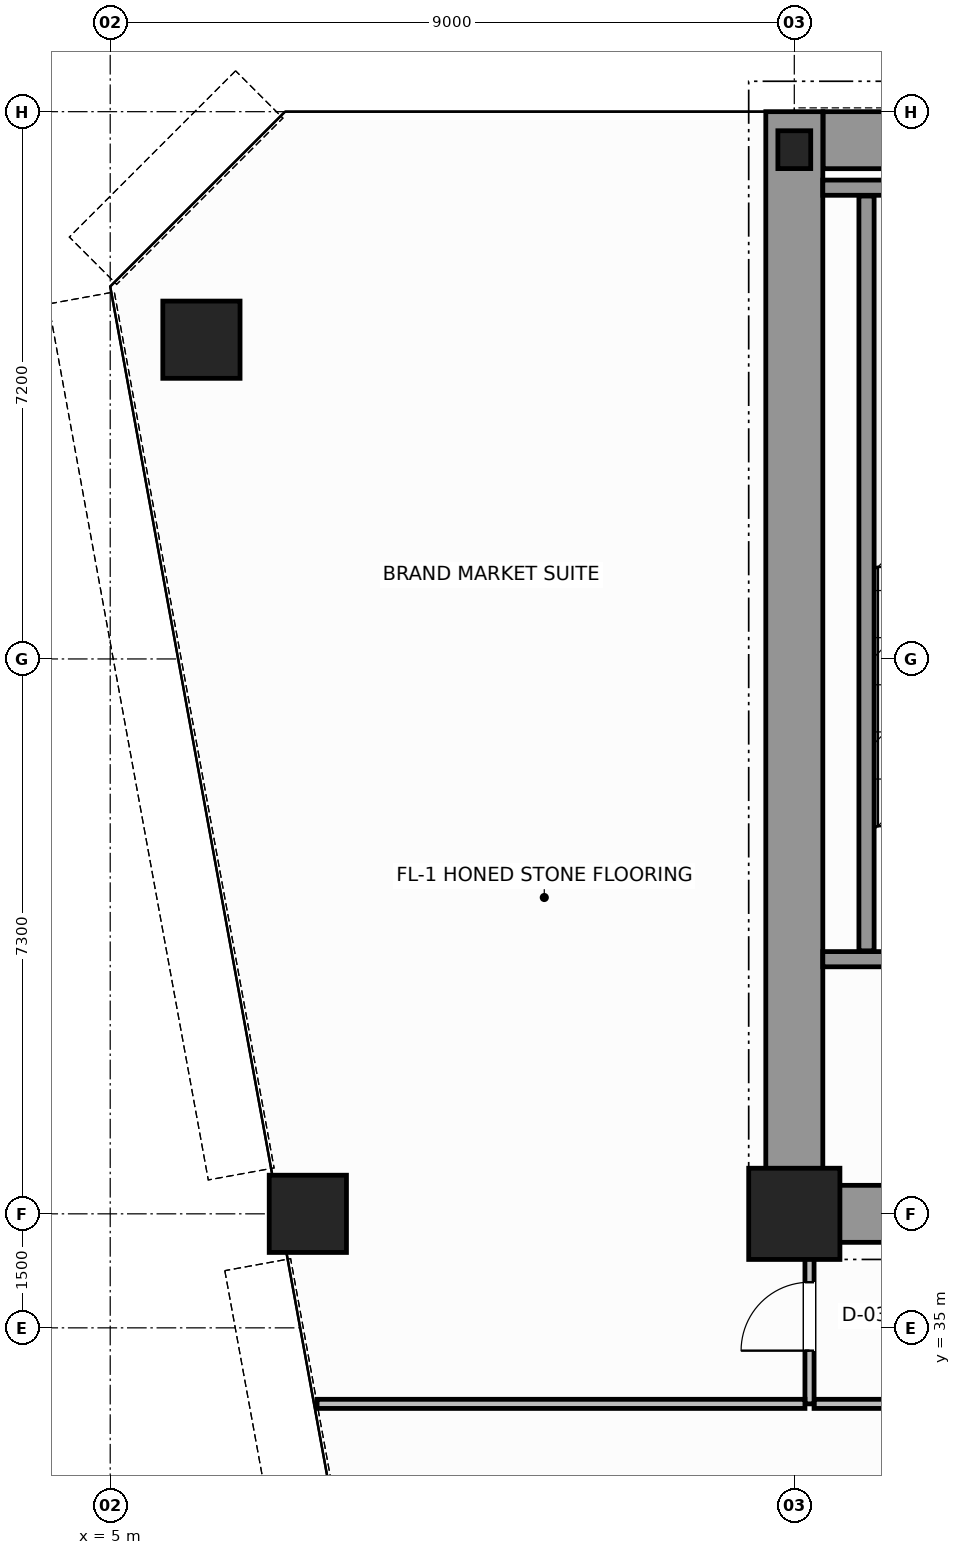
"""IFC4 building model, lengths in metres.
Left out: names, types, materials, properties, quantities, classifications, styles, units other than length and angle.
Written with IfcOpenShell. Run it as: python <this file> out.ifc"""

import sys

from ifc_helpers import new_model, si_unit, direction, frame, frame_2d, origin, origin_2d, place, context, subcontext, project, spatial, rectangle, hollow_circle, i_section, extrude, source, transform, mapped, element, fill, save


model = new_model("IFC4")
c1 = context("Model", 3, precision=1e-05, world=origin(), true_north=direction((0.0, 1.0)))
c2 = subcontext(c1, "Body", "Model", "MODEL_VIEW")
j1 = project(units=[si_unit("LENGTHUNIT", "METRE"), si_unit("PLANEANGLEUNIT", "RADIAN")], contexts=[c1])
p1 = place(None, origin())
s1 = spatial("IfcSite", under=j1, at=p1, CompositionType="ELEMENT")
p2 = place(p1, origin())
s2 = spatial("IfcBuilding", under=s1, at=p2, CompositionType="ELEMENT")
p3 = place(p2, frame((0.0, 0.0, 153.8)))
s3 = spatial("IfcBuildingStorey", under=s2, at=p3, CompositionType="ELEMENT", Elevation=153.8)
m1 = source(origin(), c2, "Body", "SweptSolid", [
    extrude(rectangle(XDim=1.2, YDim=1.2, at=origin_2d()), origin(), (0.0, 0.0, 1.0), 3.8),
])
p4 = place(p3, frame((14.0, 36.5, 0.0), z_axis=(0.0, 0.0, 1.0), x_axis=(1.0, 0.0, 0.0)))
e1 = element("IfcColumn", 1, at=p4, inside=s3, PredefinedType="COLUMN", context=c2, shape_type="MappedRepresentation", body=[
    mapped(m1, transform((0.0, 0.0, 0.0), scale=1.0)),
])
m2 = source(origin(), c2, "Body", "SweptSolid", [
    extrude(i_section(OverallWidth=0.432, OverallDepth=0.498, WebThickness=0.055, FlangeThickness=0.068, FilletRadius=0.015, at=origin_2d()), origin(), (0.0, 0.0, 1.0), 3.8),
])
p5 = place(p3, frame((14.0, 50.5, 0.0), z_axis=(0.0, 0.0, 1.0), x_axis=(1.0, 0.0, 0.0)))
e2 = element("IfcColumn", 2, at=p5, inside=s3, PredefinedType="COLUMN", context=c2, shape_type="MappedRepresentation", body=[
    mapped(m2, transform((0.0, 0.0, 0.0), scale=1.0)),
])
m3 = source(origin(), c2, "Body", "SweptSolid", [
    extrude(hollow_circle(Radius=0.508, WallThickness=0.045, at=origin_2d()), origin(), (0.0, 0.0, 1.0), 3.8),
])
for number, where, z_axis, x_axis in (
    (3, (6.2, 48.0, 0.0), (0.0, 0.0, 1.0), (1.0, 0.0, 0.0)),
    (4, (7.6, 36.5, 0.0), (0.0, 0.0, 1.0), (1.0, 0.0, 0.0)),
):
    element("IfcColumn", number, at=place(p3, frame(where, z_axis=z_axis, x_axis=x_axis)), inside=s3, PredefinedType="COLUMN", context=c2, shape_type="MappedRepresentation", body=[
        mapped(m3, transform((0.0, 0.0, 0.0), scale=1.0)),
    ])
p6 = place(p3, frame((14.379, 50.625, 0.0), z_axis=(0.0, 0.0, 1.0), x_axis=(1.0, 0.0, 0.0)))
e5 = element("IfcWall", 5, at=p6, inside=s3, PredefinedType="SHEAR", context=c2, shape_type="SweptSolid", body=[
    extrude(rectangle(XDim=19.619, YDim=0.75, at=frame_2d((9.81, 0.0))), origin(), (0.0, 0.0, 1.0), 3.8),
])
p7 = place(p3, frame((14.0, 36.5, 0.0), z_axis=(0.0, 0.0, 1.0), x_axis=(0.0, 1.0, 0.0)))
e6 = element("IfcWall", 6, at=p7, inside=s3, PredefinedType="SHEAR", context=c2, shape_type="SweptSolid", body=[
    extrude(rectangle(XDim=14.5, YDim=0.75, at=frame_2d((7.25, 0.0))), origin(), (0.0, 0.0, 1.0), 3.8),
])
p8 = place(p3, frame((14.395, 36.5, 0.0), z_axis=(0.0, 0.0, 1.0), x_axis=(1.0, 0.0, 0.0)))
e7 = element("IfcWall", 7, at=p8, inside=s3, PredefinedType="SHEAR", context=c2, shape_type="SweptSolid", body=[
    extrude(rectangle(XDim=3.805, YDim=0.75, at=frame_2d((1.902, 0.0))), origin(), (0.0, 0.0, 1.0), 2.38),
])
p9 = place(p3, frame((14.375, 39.85, 0.0), z_axis=(0.0, 0.0, 1.0), x_axis=(1.0, 0.0, 0.0)))
e8 = element("IfcWall", 8, at=p9, inside=s3, PredefinedType="SOLIDWALL", context=c2, shape_type="SweptSolid", body=[
    extrude(rectangle(XDim=4.225, YDim=0.2, at=frame_2d((2.113, 0.0))), origin(), (0.0, 0.0, 1.0), 3.8),
])
p10 = place(p9, frame((1.8, 0.0, 0.0)))
e9 = element("IfcOpeningElement", 9, at=p10, cuts=e8, PredefinedType="OPENING", context=c2, shape_type="SweptSolid", body=[
    extrude(rectangle(XDim=1.1, YDim=2.15, at=frame_2d((0.55, 1.075))), frame((0.0, 0.11, 0.0), z_axis=(0.0, -1.0, 0.0), x_axis=(1.0, 0.0, 0.0)), (0.0, 0.0, 1.0), 0.22),
])
p11 = place(p3, frame((14.375, 50.0, 0.0), z_axis=(0.0, 0.0, 1.0), x_axis=(1.0, 0.0, 0.0)))
e10 = element("IfcWall", 10, at=p11, inside=s3, PredefinedType="SOLIDWALL", context=c2, shape_type="SweptSolid", body=[
    extrude(rectangle(XDim=4.225, YDim=0.2, at=frame_2d((2.113, 0.0))), origin(), (0.0, 0.0, 1.0), 3.8),
])
p12 = place(p3, frame((14.95, 39.96, 0.0), z_axis=(0.0, 0.0, 1.0), x_axis=(0.0, 1.0, 0.0)))
e11 = element("IfcWall", 11, at=p12, inside=s3, PredefinedType="SOLIDWALL", context=c2, shape_type="SweptSolid", body=[
    extrude(rectangle(XDim=9.93, YDim=0.2, at=frame_2d((4.965, 0.0))), origin(), (0.0, 0.0, 1.0), 3.8),
])
p13 = place(p3, frame((14.26, 34.0, 0.0), z_axis=(0.0, 0.0, 1.0), x_axis=(1.0, 0.0, 0.0)))
e12 = element("IfcWall", 12, at=p13, inside=s3, PredefinedType="PARTITIONING", context=c2, shape_type="SweptSolid", body=[
    extrude(rectangle(XDim=18.08, YDim=0.12, at=frame_2d((9.04, 0.0))), origin(), (0.0, 0.0, 1.0), 3.58),
])
p14 = place(p3, frame((14.2, 34.0, 0.0), z_axis=(0.0, 0.0, 1.0), x_axis=(0.0, 1.0, 0.0)))
e13 = element("IfcWall", 13, at=p14, inside=s3, PredefinedType="PARTITIONING", context=c2, shape_type="SweptSolid", body=[
    extrude(rectangle(XDim=2.44, YDim=0.12, at=frame_2d((1.22, 0.0))), origin(), (0.0, 0.0, 1.0), 3.58),
])
p15 = place(p14, frame((0.7, 0.0, 0.0)))
e14 = element("IfcOpeningElement", 14, at=p15, cuts=e13, PredefinedType="OPENING", context=c2, shape_type="SweptSolid", body=[
    extrude(rectangle(XDim=0.9, YDim=2.15, at=frame_2d((0.45, 1.075))), frame((0.0, 0.07, 0.0), z_axis=(0.0, -1.0, 0.0), x_axis=(1.0, 0.0, 0.0)), (0.0, 0.0, 1.0), 0.14),
])
p16 = place(p3, frame((7.721, 34.0, 0.0), z_axis=(0.0, 0.0, 1.0), x_axis=(1.0, 0.0, 0.0)))
e15 = element("IfcWall", 15, at=p16, inside=s3, PredefinedType="PARTITIONING", context=c2, shape_type="SweptSolid", body=[
    extrude(rectangle(XDim=6.418, YDim=0.12, at=frame_2d((3.209, 0.0))), origin(), (0.0, 0.0, 1.0), 3.58),
])
m4 = source(origin(), c2, "Body", "SweptSolid", [
    extrude(rectangle(XDim=0.9, YDim=2.15, at=frame_2d((0.45, 1.075))), frame((0.0, 0.025, 0.0), z_axis=(0.0, -1.0, 0.0), x_axis=(1.0, 0.0, 0.0)), (0.0, 0.0, 1.0), 0.05),
])
p17 = place(p15, origin())
e16 = element("IfcDoor", 16, at=p17, inside=s3, OperationType="SINGLE_SWING_LEFT", PredefinedType="DOOR", context=c2, shape_type="MappedRepresentation", body=[
    mapped(m4, transform((0.0, 0.0, 0.0), scale=1.0)),
])
fill(e14, e16)
save(model, sys.argv[1])
